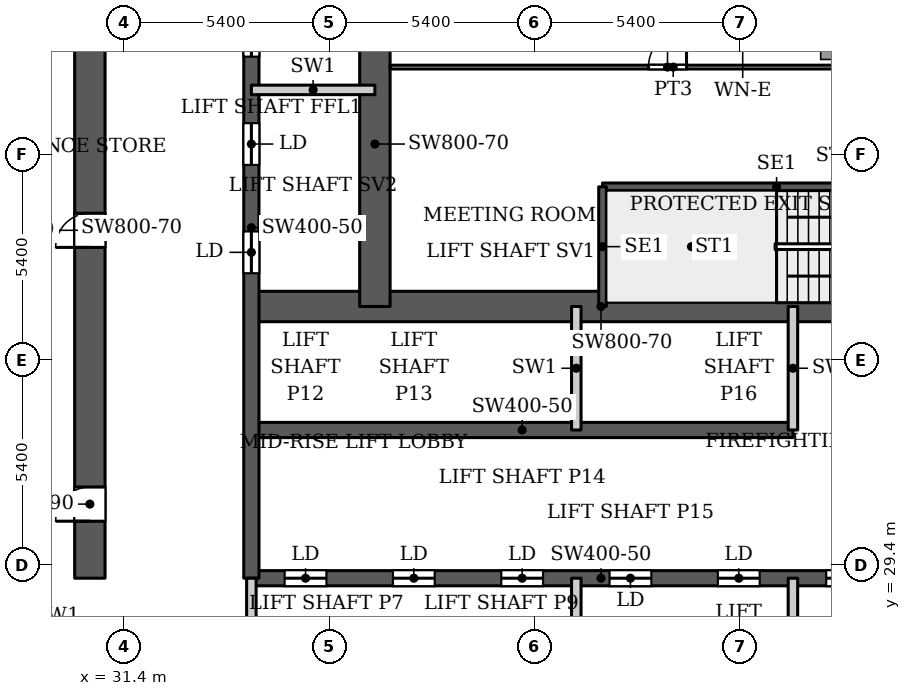
"""IFC4 building model, lengths in metres.
Left out: names, types, materials, properties, quantities, classifications, styles, units other than length and angle.
Written with IfcOpenShell. Run it as: python <this file> out.ifc"""

import sys

from ifc_helpers import new_model, si_unit, direction, frame, frame_2d, origin, place, context, subcontext, project, spatial, rectangle, extrude, source, transform, mapped, element, fill, save


model = new_model("IFC4")
c1 = context("Model", 3, precision=1e-05, world=origin(), true_north=direction((0.0, 1.0)))
c2 = subcontext(c1, "Body", "Model", "MODEL_VIEW")
j1 = project(units=[si_unit("LENGTHUNIT", "METRE"), si_unit("PLANEANGLEUNIT", "RADIAN")], contexts=[c1])
p1 = place(None, origin())
s1 = spatial("IfcSite", under=j1, at=p1, CompositionType="ELEMENT")
p2 = place(p1, origin())
s2 = spatial("IfcBuilding", under=s1, at=p2, CompositionType="ELEMENT")
p3 = place(p2, frame((0.0, 0.0, 187.7)))
s3 = spatial("IfcBuildingStorey", under=s2, at=p3, CompositionType="ELEMENT", Elevation=187.7)
p4 = place(p3, frame((34.75, 29.05, 0.0), z_axis=(0.0, 0.0, 1.0), x_axis=(1.0, 0.0, 0.0)))
e1 = element("IfcWall", 1, at=p4, inside=s3, PredefinedType="SHEAR", context=c2, shape_type="SweptSolid", body=[
    extrude(rectangle(XDim=18.4, YDim=0.4, at=frame_2d((9.2, 0.0))), origin(), (0.0, 0.0, 1.0), 3.9),
])
p5 = place(p4, frame((0.875, 0.0, 0.0)))
e2 = element("IfcOpeningElement", 2, at=p5, cuts=e1, PredefinedType="OPENING", context=c2, shape_type="SweptSolid", body=[
    extrude(rectangle(XDim=1.1, YDim=2.2, at=frame_2d((0.55, 1.1))), frame((0.0, 0.21, 0.0), z_axis=(0.0, -1.0, 0.0), x_axis=(1.0, 0.0, 0.0)), (0.0, 0.0, 1.0), 0.42),
])
p6 = place(p4, frame((3.725, 0.0, 0.0)))
e3 = element("IfcOpeningElement", 3, at=p6, cuts=e1, PredefinedType="OPENING", context=c2, shape_type="SweptSolid", body=[
    extrude(rectangle(XDim=1.1, YDim=2.2, at=frame_2d((0.55, 1.1))), frame((0.0, 0.21, 0.0), z_axis=(0.0, -1.0, 0.0), x_axis=(1.0, 0.0, 0.0)), (0.0, 0.0, 1.0), 0.42),
])
p7 = place(p4, frame((6.575, 0.0, 0.0)))
e4 = element("IfcOpeningElement", 4, at=p7, cuts=e1, PredefinedType="OPENING", context=c2, shape_type="SweptSolid", body=[
    extrude(rectangle(XDim=1.1, YDim=2.2, at=frame_2d((0.55, 1.1))), frame((0.0, 0.21, 0.0), z_axis=(0.0, -1.0, 0.0), x_axis=(1.0, 0.0, 0.0)), (0.0, 0.0, 1.0), 0.42),
])
p8 = place(p4, frame((9.425, 0.0, 0.0)))
e5 = element("IfcOpeningElement", 5, at=p8, cuts=e1, PredefinedType="OPENING", context=c2, shape_type="SweptSolid", body=[
    extrude(rectangle(XDim=1.1, YDim=2.2, at=frame_2d((0.55, 1.1))), frame((0.0, 0.21, 0.0), z_axis=(0.0, -1.0, 0.0), x_axis=(1.0, 0.0, 0.0)), (0.0, 0.0, 1.0), 0.42),
])
p9 = place(p4, frame((12.275, 0.0, 0.0)))
e6 = element("IfcOpeningElement", 6, at=p9, cuts=e1, PredefinedType="OPENING", context=c2, shape_type="SweptSolid", body=[
    extrude(rectangle(XDim=1.1, YDim=2.2, at=frame_2d((0.55, 1.1))), frame((0.0, 0.21, 0.0), z_axis=(0.0, -1.0, 0.0), x_axis=(1.0, 0.0, 0.0)), (0.0, 0.0, 1.0), 0.42),
])
p10 = place(p4, frame((15.125, 0.0, 0.0)))
e7 = element("IfcOpeningElement", 7, at=p10, cuts=e1, PredefinedType="OPENING", context=c2, shape_type="SweptSolid", body=[
    extrude(rectangle(XDim=1.1, YDim=2.2, at=frame_2d((0.55, 1.1))), frame((0.0, 0.21, 0.0), z_axis=(0.0, -1.0, 0.0), x_axis=(1.0, 0.0, 0.0)), (0.0, 0.0, 1.0), 0.42),
])
p11 = place(p3, frame((34.75, 32.95, 0.0), z_axis=(0.0, 0.0, 1.0), x_axis=(1.0, 0.0, 0.0)))
e8 = element("IfcWall", 8, at=p11, inside=s3, PredefinedType="SHEAR", context=c2, shape_type="SweptSolid", body=[
    extrude(rectangle(XDim=14.25, YDim=0.4, at=frame_2d((7.125, 0.0))), origin(), (0.0, 0.0, 1.0), 3.9),
])
p12 = place(p3, frame((34.75, 36.2, 0.0), z_axis=(0.0, 0.0, 1.0), x_axis=(1.0, 0.0, 0.0)))
e9 = element("IfcWall", 9, at=p12, inside=s3, PredefinedType="SHEAR", context=c2, shape_type="SweptSolid", body=[
    extrude(rectangle(XDim=18.4, YDim=0.8, at=frame_2d((9.2, 0.0))), origin(), (0.0, 0.0, 1.0), 3.9),
])
p13 = place(p12, frame((16.9, 0.0, 0.0)))
e10 = element("IfcOpeningElement", 10, at=p13, cuts=e9, PredefinedType="OPENING", context=c2, shape_type="SweptSolid", body=[
    extrude(rectangle(XDim=1.0, YDim=2.2, at=frame_2d((0.5, 1.1))), frame((0.0, 0.41, 0.0), z_axis=(0.0, -1.0, 0.0), x_axis=(1.0, 0.0, 0.0)), (0.0, 0.0, 1.0), 0.82),
])
p14 = place(p3, frame((34.75, 29.05, 0.0), z_axis=(0.0, 0.0, 1.0), x_axis=(0.0, 1.0, 0.0)))
e11 = element("IfcWall", 11, at=p14, inside=s3, PredefinedType="SHEAR", context=c2, shape_type="SweptSolid", body=[
    extrude(rectangle(XDim=18.45, YDim=0.4, at=frame_2d((9.225, 0.0))), origin(), (0.0, 0.0, 1.0), 3.9),
])
p15 = place(p14, frame((8.025, 0.0, 0.0)))
e12 = element("IfcOpeningElement", 12, at=p15, cuts=e11, PredefinedType="OPENING", context=c2, shape_type="SweptSolid", body=[
    extrude(rectangle(XDim=1.1, YDim=2.2, at=frame_2d((0.55, 1.1))), frame((0.0, 0.21, 0.0), z_axis=(0.0, -1.0, 0.0), x_axis=(1.0, 0.0, 0.0)), (0.0, 0.0, 1.0), 0.42),
])
p16 = place(p14, frame((10.875, 0.0, 0.0)))
e13 = element("IfcOpeningElement", 13, at=p16, cuts=e11, PredefinedType="OPENING", context=c2, shape_type="SweptSolid", body=[
    extrude(rectangle(XDim=1.1, YDim=2.2, at=frame_2d((0.55, 1.1))), frame((0.0, 0.21, 0.0), z_axis=(0.0, -1.0, 0.0), x_axis=(1.0, 0.0, 0.0)), (0.0, 0.0, 1.0), 0.42),
])
p17 = place(p14, frame((13.725, 0.0, 0.0)))
e14 = element("IfcOpeningElement", 14, at=p17, cuts=e11, PredefinedType="OPENING", context=c2, shape_type="SweptSolid", body=[
    extrude(rectangle(XDim=1.1, YDim=2.2, at=frame_2d((0.55, 1.1))), frame((0.0, 0.21, 0.0), z_axis=(0.0, -1.0, 0.0), x_axis=(1.0, 0.0, 0.0)), (0.0, 0.0, 1.0), 0.42),
])
p18 = place(p14, frame((15.95, 0.0, 0.0)))
e15 = element("IfcOpeningElement", 15, at=p18, cuts=e11, PredefinedType="OPENING", context=c2, shape_type="SweptSolid", body=[
    extrude(rectangle(XDim=1.1, YDim=2.2, at=frame_2d((0.55, 1.1))), frame((0.0, 0.21, 0.0), z_axis=(0.0, -1.0, 0.0), x_axis=(1.0, 0.0, 0.0)), (0.0, 0.0, 1.0), 0.42),
])
p19 = place(p3, frame((38.0, 36.2, 0.0), z_axis=(0.0, 0.0, 1.0), x_axis=(0.0, 1.0, 0.0)))
e16 = element("IfcWall", 16, at=p19, inside=s3, PredefinedType="SHEAR", context=c2, shape_type="SweptSolid", body=[
    extrude(rectangle(XDim=8.55, YDim=0.8, at=frame_2d((4.275, 0.0))), origin(), (0.0, 0.0, 1.0), 3.9),
])
p20 = place(p3, frame((30.5, 29.05, 0.0), z_axis=(0.0, 0.0, 1.0), x_axis=(0.0, 1.0, 0.0)))
e17 = element("IfcWall", 17, at=p20, inside=s3, PredefinedType="SHEAR", context=c2, shape_type="SweptSolid", body=[
    extrude(rectangle(XDim=18.45, YDim=0.8, at=frame_2d((9.225, 0.0))), origin(), (0.0, 0.0, 1.0), 3.9),
])
p21 = place(p20, frame((1.5, 0.0, 0.0)))
e18 = element("IfcOpeningElement", 18, at=p21, cuts=e17, PredefinedType="OPENING", context=c2, shape_type="SweptSolid", body=[
    extrude(rectangle(XDim=0.9, YDim=2.2, at=frame_2d((0.45, 1.1))), frame((0.0, 0.41, 0.0), z_axis=(0.0, -1.0, 0.0), x_axis=(1.0, 0.0, 0.0)), (0.0, 0.0, 1.0), 0.82),
])
p22 = place(p20, frame((8.705, 0.0, 0.0)))
e19 = element("IfcOpeningElement", 19, at=p22, cuts=e17, PredefinedType="OPENING", context=c2, shape_type="SweptSolid", body=[
    extrude(rectangle(XDim=0.9, YDim=2.2, at=frame_2d((0.45, 1.1))), frame((0.0, 0.41, 0.0), z_axis=(0.0, -1.0, 0.0), x_axis=(1.0, 0.0, 0.0)), (0.0, 0.0, 1.0), 0.82),
])
p23 = place(p3, frame((29.712, 26.072, 0.0), z_axis=(0.0, 0.0, 1.0), x_axis=(-0.511028049012, 0.859564036662, 0.0)))
e20 = element("IfcWall", 20, at=p23, inside=s3, PredefinedType="SOLIDWALL", context=c2, shape_type="SweptSolid", body=[
    extrude(rectangle(XDim=4.634, YDim=0.25, at=frame_2d((2.317, 0.0))), origin(), (0.0, 0.0, 1.0), 3.147),
])
p24 = place(p3, frame((27.195, 31.969, 0.0), z_axis=(0.0, 0.0, 1.0), x_axis=(0.052554995867, 0.998618031286, 0.0)))
e21 = element("IfcWall", 21, at=p24, inside=s3, PredefinedType="SOLIDWALL", context=c2, shape_type="SweptSolid", body=[
    extrude(rectangle(XDim=66.787, YDim=0.25, at=frame_2d((33.394, 0.0))), origin(), (0.0, 0.0, 1.0), 3.75),
])
p25 = place(p3, frame((43.99, 39.35, 0.0), z_axis=(0.0, 0.0, 1.0), x_axis=(1.0, 0.0, 0.0)))
e22 = element("IfcWall", 22, at=p25, inside=s3, PredefinedType="SHEAR", context=c2, shape_type="SweptSolid", body=[
    extrude(rectangle(XDim=9.16, YDim=0.2, at=frame_2d((4.58, 0.0))), origin(), (0.0, 0.0, 1.0), 3.9),
])
p26 = place(p3, frame((43.99, 36.2, 0.0), z_axis=(0.0, 0.0, 1.0), x_axis=(0.0, 1.0, 0.0)))
e23 = element("IfcWall", 23, at=p26, inside=s3, PredefinedType="SHEAR", context=c2, shape_type="SweptSolid", body=[
    extrude(rectangle(XDim=3.15, YDim=0.2, at=frame_2d((1.575, 0.0))), origin(), (0.0, 0.0, 1.0), 3.9),
])
for number, where, z_axis, x_axis in (
    (24, (34.75, 25.8, 0.0), (0.0, 0.0, 1.0), (0.0, 1.0, 0.0)),
    (25, (43.3, 25.8, 0.0), (0.0, 0.0, 1.0), (0.0, 1.0, 0.0)),
    (26, (43.3, 32.95, 0.0), (0.0, 0.0, 1.0), (0.0, 1.0, 0.0)),
    (27, (49.0, 25.8, 0.0), (0.0, 0.0, 1.0), (0.0, 1.0, 0.0)),
    (28, (49.0, 32.95, 0.0), (0.0, 0.0, 1.0), (0.0, 1.0, 0.0)),
    (29, (34.75, 41.9, 0.0), (0.0, 0.0, 1.0), (1.0, 0.0, 0.0)),
):
    element("IfcWall", number, at=place(p3, frame(where, z_axis=z_axis, x_axis=x_axis)), inside=s3, PredefinedType="PARTITIONING", context=c2, shape_type="SweptSolid", body=[
        extrude(rectangle(XDim=3.25, YDim=0.25, at=frame_2d((1.625, 0.0))), origin(), (0.0, 0.0, 1.0), 3.9),
    ])
p27 = place(p3, frame((38.399, 42.5, 0.0), z_axis=(0.0, 0.0, 1.0), x_axis=(1.0, 0.0, 0.0)))
e30 = element("IfcWall", 30, at=p27, inside=s3, PredefinedType="PARTITIONING", context=c2, shape_type="SweptSolid", body=[
    extrude(rectangle(XDim=14.901, YDim=0.1, at=frame_2d((7.451, 0.0))), origin(), (0.0, 0.0, 1.0), 3.6),
])
p28 = place(p27, frame((6.801, 0.0, 0.0)))
e31 = element("IfcOpeningElement", 31, at=p28, cuts=e30, PredefinedType="OPENING", context=c2, shape_type="SweptSolid", body=[
    extrude(rectangle(XDim=1.0, YDim=2.1, at=frame_2d((0.5, 1.05))), frame((0.0, 0.06, 0.0), z_axis=(0.0, -1.0, 0.0), x_axis=(1.0, 0.0, 0.0)), (0.0, 0.0, 1.0), 0.12),
])
m1 = source(origin(), c2, "Body", "SweptSolid", [
    extrude(rectangle(XDim=1.1, YDim=2.2, at=frame_2d((0.55, 1.1))), frame((0.0, 0.025, 0.0), z_axis=(0.0, -1.0, 0.0), x_axis=(1.0, 0.0, 0.0)), (0.0, 0.0, 1.0), 0.05),
])
p29 = place(p5, origin())
e32 = element("IfcDoor", 32, at=p29, inside=s3, OperationType="SLIDING_TO_LEFT", PredefinedType="DOOR", context=c2, shape_type="MappedRepresentation", body=[
    mapped(m1, transform((0.0, 0.0, 0.0), x_axis=(1.0, 0.0, 0.0), y_axis=(0.0, 1.0, 0.0), z_axis=(0.0, 0.0, 1.0), scale=1.0)),
])
fill(e2, e32)
p30 = place(p6, origin())
e33 = element("IfcDoor", 33, at=p30, inside=s3, OperationType="SLIDING_TO_LEFT", PredefinedType="DOOR", context=c2, shape_type="MappedRepresentation", body=[
    mapped(m1, transform((0.0, 0.0, 0.0), x_axis=(1.0, 0.0, 0.0), y_axis=(0.0, 1.0, 0.0), z_axis=(0.0, 0.0, 1.0), scale=1.0)),
])
fill(e3, e33)
p31 = place(p7, origin())
e34 = element("IfcDoor", 34, at=p31, inside=s3, OperationType="SLIDING_TO_LEFT", PredefinedType="DOOR", context=c2, shape_type="MappedRepresentation", body=[
    mapped(m1, transform((0.0, 0.0, 0.0), x_axis=(1.0, 0.0, 0.0), y_axis=(0.0, 1.0, 0.0), z_axis=(0.0, 0.0, 1.0), scale=1.0)),
])
fill(e4, e34)
p32 = place(p8, origin())
e35 = element("IfcDoor", 35, at=p32, inside=s3, OperationType="SLIDING_TO_LEFT", PredefinedType="DOOR", context=c2, shape_type="MappedRepresentation", body=[
    mapped(m1, transform((0.0, 0.0, 0.0), x_axis=(1.0, 0.0, 0.0), y_axis=(0.0, 1.0, 0.0), z_axis=(0.0, 0.0, 1.0), scale=1.0)),
])
fill(e5, e35)
p33 = place(p9, origin())
e36 = element("IfcDoor", 36, at=p33, inside=s3, OperationType="SLIDING_TO_LEFT", PredefinedType="DOOR", context=c2, shape_type="MappedRepresentation", body=[
    mapped(m1, transform((0.0, 0.0, 0.0), x_axis=(1.0, 0.0, 0.0), y_axis=(0.0, 1.0, 0.0), z_axis=(0.0, 0.0, 1.0), scale=1.0)),
])
fill(e6, e36)
p34 = place(p15, origin())
e37 = element("IfcDoor", 37, at=p34, inside=s3, OperationType="SLIDING_TO_LEFT", PredefinedType="DOOR", context=c2, shape_type="MappedRepresentation", body=[
    mapped(m1, transform((0.0, 0.0, 0.0), x_axis=(1.0, 0.0, 0.0), y_axis=(0.0, 1.0, 0.0), z_axis=(0.0, 0.0, 1.0), scale=1.0)),
])
fill(e12, e37)
p35 = place(p16, origin())
e38 = element("IfcDoor", 38, at=p35, inside=s3, OperationType="SLIDING_TO_LEFT", PredefinedType="DOOR", context=c2, shape_type="MappedRepresentation", body=[
    mapped(m1, transform((0.0, 0.0, 0.0), x_axis=(1.0, 0.0, 0.0), y_axis=(0.0, 1.0, 0.0), z_axis=(0.0, 0.0, 1.0), scale=1.0)),
])
fill(e13, e38)
p36 = place(p17, origin())
e39 = element("IfcDoor", 39, at=p36, inside=s3, OperationType="SLIDING_TO_LEFT", PredefinedType="DOOR", context=c2, shape_type="MappedRepresentation", body=[
    mapped(m1, transform((0.0, 0.0, 0.0), x_axis=(1.0, 0.0, 0.0), y_axis=(0.0, 1.0, 0.0), z_axis=(0.0, 0.0, 1.0), scale=1.0)),
])
fill(e14, e39)
p37 = place(p10, origin())
e40 = element("IfcDoor", 40, at=p37, inside=s3, OperationType="SLIDING_TO_LEFT", PredefinedType="DOOR", context=c2, shape_type="MappedRepresentation", body=[
    mapped(m1, transform((0.0, 0.0, 0.0), x_axis=(1.0, 0.0, 0.0), y_axis=(0.0, 1.0, 0.0), z_axis=(0.0, 0.0, 1.0), scale=1.0)),
])
fill(e7, e40)
m2 = source(origin(), c2, "Body", "SweptSolid", [
    extrude(rectangle(XDim=0.9, YDim=2.2, at=frame_2d((0.45, 1.1))), frame((0.0, 0.025, 0.0), z_axis=(0.0, -1.0, 0.0), x_axis=(1.0, 0.0, 0.0)), (0.0, 0.0, 1.0), 0.05),
])
p38 = place(p21, origin())
e41 = element("IfcDoor", 41, at=p38, inside=s3, OperationType="SINGLE_SWING_LEFT", PredefinedType="DOOR", context=c2, shape_type="MappedRepresentation", body=[
    mapped(m2, transform((0.0, 0.0, 0.0), x_axis=(1.0, 0.0, 0.0), y_axis=(0.0, 1.0, 0.0), z_axis=(0.0, 0.0, 1.0), scale=1.0)),
])
fill(e18, e41)
p39 = place(p22, origin())
e42 = element("IfcDoor", 42, at=p39, inside=s3, OperationType="SINGLE_SWING_LEFT", PredefinedType="DOOR", context=c2, shape_type="MappedRepresentation", body=[
    mapped(m2, transform((0.0, 0.0, 0.0), x_axis=(1.0, 0.0, 0.0), y_axis=(0.0, 1.0, 0.0), z_axis=(0.0, 0.0, 1.0), scale=1.0)),
])
fill(e19, e42)
m3 = source(origin(), c2, "Body", "SweptSolid", [
    extrude(rectangle(XDim=1.0, YDim=2.1, at=frame_2d((0.5, 1.05))), frame((0.0, 0.025, 0.0), z_axis=(0.0, -1.0, 0.0), x_axis=(1.0, 0.0, 0.0)), (0.0, 0.0, 1.0), 0.05),
])
p40 = place(p28, origin())
e43 = element("IfcDoor", 43, at=p40, inside=s3, OperationType="SINGLE_SWING_LEFT", PredefinedType="DOOR", context=c2, shape_type="MappedRepresentation", body=[
    mapped(m3, transform((0.0, 0.0, 0.0), x_axis=(1.0, 0.0, 0.0), y_axis=(0.0, 1.0, 0.0), z_axis=(0.0, 0.0, 1.0), scale=1.0)),
])
fill(e31, e43)
save(model, sys.argv[1])
